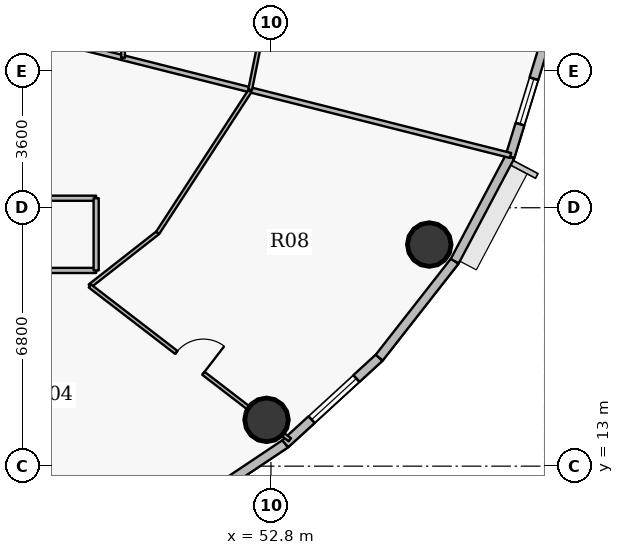
"""IFC4 building model, lengths in metres.
Left out: names, types, materials, properties, quantities, classifications, styles, units other than length and angle.
Written with IfcOpenShell. Run it as: python <this file> out.ifc"""

import sys

from ifc_helpers import new_model, si_unit, direction, frame, frame_2d, origin, origin_2d, place, context, subcontext, project, spatial, rectangle, hollow_circle, extrude, source, transform, mapped, element, fill, save


model = new_model("IFC4")
c1 = context("Model", 3, precision=1e-05, world=origin(), true_north=direction((0.0, 1.0)))
c2 = subcontext(c1, "Body", "Model", "MODEL_VIEW")
j1 = project(units=[si_unit("LENGTHUNIT", "METRE"), si_unit("PLANEANGLEUNIT", "RADIAN")], contexts=[c1])
p1 = place(None, origin())
s1 = spatial("IfcSite", under=j1, at=p1, CompositionType="ELEMENT")
p2 = place(p1, origin())
s2 = spatial("IfcBuilding", under=s1, at=p2, CompositionType="ELEMENT")
p3 = place(p2, frame((0.0, 0.0, 259.05)))
s3 = spatial("IfcBuildingStorey", under=s2, at=p3, CompositionType="ELEMENT", Elevation=259.05)
for number, where, z_axis, x_axis in (
    (1, (52.683, 14.219, 0.0), (0.0, 0.0, 1.0), (1.0, 0.0, 0.0)),
    (2, (56.965, 18.831, 0.0), (0.0, 0.0, 1.0), (1.0, 0.0, 0.0)),
):
    element("IfcColumn", number, at=place(p3, frame(where, z_axis=z_axis, x_axis=x_axis)), inside=s3, PredefinedType="COLUMN", context=c2, shape_type="SweptSolid", body=[
        extrude(hollow_circle(Radius=0.575, WallThickness=0.036, at=origin_2d()), origin(), (0.0, 0.0, 1.0), 3.75),
    ])
p4 = place(p3, frame((53.176, 13.589, 0.0), z_axis=(0.0, 0.0, 1.0), x_axis=(-0.831262496074, -0.555880079352, 0.0)))
e3 = element("IfcWall", 3, at=p4, inside=s3, PredefinedType="SOLIDWALL", context=c2, shape_type="SweptSolid", body=[
    extrude(rectangle(XDim=3.484, YDim=0.24, at=frame_2d((1.742, 0.0))), origin(), (0.0, 0.0, 1.0), 3.45),
])
p5 = place(p3, frame((55.648, 15.855, 0.0), z_axis=(0.0, 0.0, 1.0), x_axis=(-0.737123922599, -0.675757591694, 0.0)))
e4 = element("IfcWall", 4, at=p5, inside=s3, PredefinedType="SOLIDWALL", context=c2, shape_type="SweptSolid", body=[
    extrude(rectangle(XDim=3.354, YDim=0.24, at=frame_2d((1.677, 0.0))), origin(), (0.0, 0.0, 1.0), 3.45),
])
p6 = place(p5, frame((0.813, 0.0, 0.9)))
e5 = element("IfcOpeningElement", 5, at=p6, cuts=e4, PredefinedType="OPENING", context=c2, shape_type="SweptSolid", body=[
    extrude(rectangle(XDim=1.6, YDim=1.75, at=origin_2d()), frame((0.8, 0.13, 0.875), z_axis=(0.0, -1.0, 0.0), x_axis=(1.0, 0.0, 0.0)), (0.0, 0.0, 1.0), 0.26),
])
p7 = place(p3, frame((57.636, 18.395, 0.0), z_axis=(0.0, 0.0, 1.0), x_axis=(-0.616312344705, -0.787501805562, 0.0)))
e6 = element("IfcWall", 6, at=p7, inside=s3, PredefinedType="SOLIDWALL", context=c2, shape_type="SweptSolid", body=[
    extrude(rectangle(XDim=3.225, YDim=0.24, at=frame_2d((1.612, 0.0))), origin(), (0.0, 0.0, 1.0), 3.45),
])
p8 = place(p3, frame((59.09, 21.144, 0.0), z_axis=(0.0, 0.0, 1.0), x_axis=(-0.46766049993, -0.883908172157, 0.0)))
e7 = element("IfcWall", 7, at=p8, inside=s3, PredefinedType="SOLIDWALL", context=c2, shape_type="SweptSolid", body=[
    extrude(rectangle(XDim=3.11, YDim=0.24, at=frame_2d((1.555, 0.0))), origin(), (0.0, 0.0, 1.0), 3.45),
])
p9 = place(p3, frame((59.977, 24.036, 0.0), z_axis=(0.0, 0.0, 1.0), x_axis=(-0.293132907334, -0.95607170162, 0.0)))
e8 = element("IfcWall", 8, at=p9, inside=s3, PredefinedType="SOLIDWALL", context=c2, shape_type="SweptSolid", body=[
    extrude(rectangle(XDim=3.025, YDim=0.24, at=frame_2d((1.512, 0.0))), origin(), (0.0, 0.0, 1.0), 3.45),
])
p10 = place(p9, frame((0.88, 0.0, 0.9)))
e9 = element("IfcOpeningElement", 9, at=p10, cuts=e8, PredefinedType="OPENING", context=c2, shape_type="SweptSolid", body=[
    extrude(rectangle(XDim=1.25, YDim=1.65, at=origin_2d()), frame((0.625, 0.13, 0.825), z_axis=(0.0, -1.0, 0.0), x_axis=(1.0, 0.0, 0.0)), (0.0, 0.0, 1.0), 0.26),
])
p11 = place(p3, frame((24.35, 18.15, 0.0), z_axis=(0.0, 0.0, 1.0), x_axis=(1.0, 0.0, 0.0)))
e10 = element("IfcWall", 10, at=p11, inside=s3, PredefinedType="PARTITIONING", context=c2, shape_type="SweptSolid", body=[
    extrude(rectangle(XDim=23.85, YDim=0.135, at=frame_2d((11.925, 0.0))), origin(), (0.0, 0.0, 1.0), 2.885),
])
p12 = place(p11, frame((6.069, 0.0, 0.0)))
e11 = element("IfcOpeningElement", 11, at=p12, cuts=e10, PredefinedType="OPENING", context=c2, shape_type="SweptSolid", body=[
    extrude(rectangle(XDim=1.0, YDim=2.15, at=origin_2d()), frame((0.5, 0.078, 1.075), z_axis=(0.0, -1.0, 0.0), x_axis=(1.0, 0.0, 0.0)), (0.0, 0.0, 1.0), 0.155),
])
p13 = place(p11, frame((19.505, 0.0, 0.0)))
e12 = element("IfcOpeningElement", 12, at=p13, cuts=e10, PredefinedType="OPENING", context=c2, shape_type="SweptSolid", body=[
    extrude(rectangle(XDim=1.0, YDim=2.15, at=origin_2d()), frame((0.5, 0.078, 1.075), z_axis=(0.0, -1.0, 0.0), x_axis=(1.0, 0.0, 0.0)), (0.0, 0.0, 1.0), 0.155),
])
p14 = place(p3, frame((45.8, 20.05, 0.0), z_axis=(0.0, 0.0, 1.0), x_axis=(1.0, 0.0, 0.0)))
e13 = element("IfcWall", 13, at=p14, inside=s3, PredefinedType="PARTITIONING", context=c2, shape_type="SweptSolid", body=[
    extrude(rectangle(XDim=2.4, YDim=0.135, at=frame_2d((1.2, 0.0))), origin(), (0.0, 0.0, 1.0), 3.45),
])
p15 = place(p3, frame((46.215, 24.425, 0.0), z_axis=(0.0, 0.0, 1.0), x_axis=(0.969657665326, -0.244466791355, 0.0)))
e14 = element("IfcWall", 14, at=p15, inside=s3, PredefinedType="PARTITIONING", context=c2, shape_type="SweptSolid", body=[
    extrude(rectangle(XDim=13.293, YDim=0.135, at=frame_2d((6.646, 0.0))), origin(), (0.0, 0.0, 1.0), 2.935),
])
p16 = place(p3, frame((48.034, 17.743, 0.0), z_axis=(0.0, 0.0, 1.0), x_axis=(0.787427677995, 0.616407050517, 0.0)))
e15 = element("IfcWall", 15, at=p16, inside=s3, PredefinedType="PARTITIONING", context=c2, shape_type="SweptSolid", body=[
    extrude(rectangle(XDim=2.266, YDim=0.1, at=frame_2d((1.133, 0.0))), origin(), (0.0, 0.0, 1.0), 2.885),
])
p17 = place(p3, frame((48.034, 17.743, 0.0), z_axis=(0.0, 0.0, 1.0), x_axis=(0.792617155724, -0.609719644141, 0.0)))
e16 = element("IfcWall", 16, at=p17, inside=s3, PredefinedType="PARTITIONING", context=c2, shape_type="SweptSolid", body=[
    extrude(rectangle(XDim=6.641, YDim=0.1, at=frame_2d((3.32, 0.0))), origin(), (0.0, 0.0, 1.0), 2.885),
])
p18 = place(p17, frame((2.87, 0.0, 0.0)))
e17 = element("IfcOpeningElement", 17, at=p18, cuts=e16, PredefinedType="OPENING", context=c2, shape_type="SweptSolid", body=[
    extrude(rectangle(XDim=0.9, YDim=2.1, at=origin_2d()), frame((0.45, 0.06, 1.05), z_axis=(0.0, -1.0, 0.0), x_axis=(1.0, 0.0, 0.0)), (0.0, 0.0, 1.0), 0.12),
])
p19 = place(p3, frame((48.2, 18.15, 0.0), z_axis=(0.0, 0.0, 1.0), x_axis=(0.0, 1.0, 0.0)))
e18 = element("IfcWall", 18, at=p19, inside=s3, PredefinedType="PARTITIONING", context=c2, shape_type="SweptSolid", body=[
    extrude(rectangle(XDim=1.9, YDim=0.135, at=frame_2d((0.95, 0.0))), origin(), (0.0, 0.0, 1.0), 3.45),
])
p20 = place(p3, frame((48.908, 23.746, 0.0), z_axis=(0.0, 0.0, 1.0), x_axis=(0.0, 1.0, 0.0)))
e19 = element("IfcWall", 19, at=p20, inside=s3, PredefinedType="PARTITIONING", context=c2, shape_type="SweptSolid", body=[
    extrude(rectangle(XDim=10.204, YDim=0.1, at=frame_2d((5.102, 0.0))), origin(), (0.0, 0.0, 1.0), 2.885),
])
p21 = place(p20, frame((4.652, 0.0, 0.0)))
e20 = element("IfcOpeningElement", 20, at=p21, cuts=e19, PredefinedType="OPENING", context=c2, shape_type="SweptSolid", body=[
    extrude(rectangle(XDim=0.9, YDim=2.1, at=origin_2d()), frame((0.45, 0.06, 1.05), z_axis=(0.0, -1.0, 0.0), x_axis=(1.0, 0.0, 0.0)), (0.0, 0.0, 1.0), 0.12),
])
p22 = place(p3, frame((49.818, 19.139, 0.0), z_axis=(0.0, 0.0, 1.0), x_axis=(0.545406924684, 0.83817139447, 0.0)))
e21 = element("IfcWall", 21, at=p22, inside=s3, PredefinedType="PARTITIONING", context=c2, shape_type="SweptSolid", body=[
    extrude(rectangle(XDim=4.448, YDim=0.1, at=frame_2d((2.224, 0.0))), origin(), (0.0, 0.0, 1.0), 2.885),
])
p23 = place(p3, frame((52.251, 22.903, 0.0), z_axis=(0.0, 0.0, 1.0), x_axis=(0.198227662963, 0.980156004744, 0.0)))
e22 = element("IfcWall", 22, at=p23, inside=s3, PredefinedType="PARTITIONING", context=c2, shape_type="SweptSolid", body=[
    extrude(rectangle(XDim=4.024, YDim=0.1, at=frame_2d((2.012, 0.0))), origin(), (0.0, 0.0, 1.0), 2.885),
])
p24 = place(p23, frame((1.562, 0.0, 0.0)))
e23 = element("IfcOpeningElement", 23, at=p24, cuts=e22, PredefinedType="OPENING", context=c2, shape_type="SweptSolid", body=[
    extrude(rectangle(XDim=0.9, YDim=2.1, at=origin_2d()), frame((0.45, 0.06, 1.05), z_axis=(0.0, -1.0, 0.0), x_axis=(1.0, 0.0, 0.0)), (0.0, 0.0, 1.0), 0.12),
])
m1 = source(origin(), c2, "Body", "SweptSolid", [
    extrude(rectangle(XDim=1.6, YDim=1.75, at=origin_2d()), frame((0.8, 0.03, 0.875), z_axis=(0.0, -1.0, 0.0), x_axis=(1.0, 0.0, 0.0)), (0.0, 0.0, 1.0), 0.06),
])
p25 = place(p6, origin())
e24 = element("IfcWindow", 24, at=p25, inside=s3, PartitioningType="DOUBLE_PANEL_VERTICAL", PredefinedType="WINDOW", context=c2, shape_type="MappedRepresentation", body=[
    mapped(m1, transform((0.0, 0.0, 0.0), x_axis=(1.0, 0.0, 0.0), y_axis=(0.0, 1.0, 0.0), z_axis=(0.0, 0.0, 1.0), scale=1.0)),
])
fill(e5, e24)
m2 = source(origin(), c2, "Body", "SweptSolid", [
    extrude(rectangle(XDim=1.25, YDim=1.65, at=origin_2d()), frame((0.625, 0.03, 0.825), z_axis=(0.0, -1.0, 0.0), x_axis=(1.0, 0.0, 0.0)), (0.0, 0.0, 1.0), 0.06),
])
p26 = place(p10, origin())
e25 = element("IfcWindow", 25, at=p26, inside=s3, PartitioningType="SINGLE_PANEL", PredefinedType="WINDOW", context=c2, shape_type="MappedRepresentation", body=[
    mapped(m2, transform((0.0, 0.0, 0.0), x_axis=(1.0, 0.0, 0.0), y_axis=(0.0, 1.0, 0.0), z_axis=(0.0, 0.0, 1.0), scale=1.0)),
])
fill(e9, e25)
m3 = source(origin(), c2, "Body", "SweptSolid", [
    extrude(rectangle(XDim=0.9, YDim=2.1, at=origin_2d()), frame((0.45, 0.025, 1.05), z_axis=(0.0, -1.0, 0.0), x_axis=(1.0, 0.0, 0.0)), (0.0, 0.0, 1.0), 0.05),
])
p27 = place(p18, origin())
e26 = element("IfcDoor", 26, at=p27, inside=s3, OperationType="SINGLE_SWING_RIGHT", PredefinedType="DOOR", context=c2, shape_type="MappedRepresentation", body=[
    mapped(m3, transform((0.0, 0.0, 0.0), x_axis=(1.0, 0.0, 0.0), y_axis=(0.0, 1.0, 0.0), z_axis=(0.0, 0.0, 1.0), scale=1.0)),
])
fill(e17, e26)
save(model, sys.argv[1])
